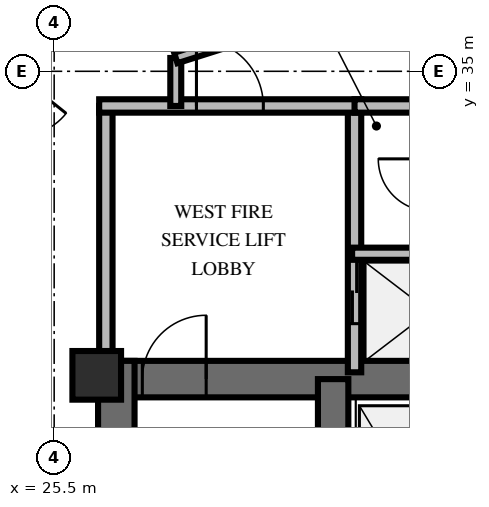
"""IFC4 building model, lengths in metres.
Left out: names, types, materials, properties, quantities, classifications, styles, units other than length and angle.
Written with IfcOpenShell. Run it as: python <this file> out.ifc"""

import sys

from ifc_helpers import new_model, si_unit, direction, frame, frame_2d, origin, origin_2d, place, context, subcontext, project, spatial, rectangle, extrude, element, fill, save


model = new_model("IFC4")
c1 = context("Model", 3, precision=1e-05, world=origin(), true_north=direction((0.0, 1.0)))
c2 = subcontext(c1, "Body", "Model", "MODEL_VIEW")
j1 = project(units=[si_unit("LENGTHUNIT", "METRE"), si_unit("PLANEANGLEUNIT", "RADIAN")], contexts=[c1])
p1 = place(None, origin())
s1 = spatial("IfcSite", under=j1, at=p1, CompositionType="ELEMENT")
p2 = place(p1, origin())
s2 = spatial("IfcBuilding", under=s1, at=p2, CompositionType="ELEMENT")
p3 = place(p2, frame((0.0, 0.0, 244.8)))
s3 = spatial("IfcBuildingStorey", under=s2, at=p3, CompositionType="ELEMENT", Elevation=244.8)
p4 = place(p3, frame((26.222, 29.938, 0.0), z_axis=(0.0, 0.0, 1.0), x_axis=(1.0, 0.0, 0.0)))
e1 = element("IfcWall", 1, at=p4, inside=s3, PredefinedType="SHEAR", context=c2, shape_type="SweptSolid", body=[
    extrude(rectangle(XDim=15.566, YDim=0.6, at=frame_2d((7.783, 0.0))), origin(), (0.0, 0.0, 1.0), 3.6),
])
p5 = place(p4, frame((0.728, 0.0, 0.0)))
e2 = element("IfcOpeningElement", 2, at=p5, cuts=e1, PredefinedType="OPENING", context=c2, shape_type="SweptSolid", body=[
    extrude(rectangle(XDim=1.05, YDim=2.15, at=frame_2d((0.525, 1.075))), frame((0.0, 0.31, 0.0), z_axis=(0.0, -1.0, 0.0), x_axis=(1.0, 0.0, 0.0)), (0.0, 0.0, 1.0), 0.62),
])
p6 = place(p4, frame((13.778, 0.0, 0.0)))
e3 = element("IfcOpeningElement", 3, at=p6, cuts=e1, PredefinedType="OPENING", context=c2, shape_type="SweptSolid", body=[
    extrude(rectangle(XDim=1.05, YDim=2.15, at=frame_2d((0.525, 1.075))), frame((0.0, 0.31, 0.0), z_axis=(0.0, -1.0, 0.0), x_axis=(1.0, 0.0, 0.0)), (0.0, 0.0, 1.0), 0.62),
])
p7 = place(p4, frame((7.228, 0.0, 0.0)))
e4 = element("IfcOpeningElement", 4, at=p7, cuts=e1, PredefinedType="OPENING", context=c2, shape_type="SweptSolid", body=[
    extrude(rectangle(XDim=1.1, YDim=2.15, at=frame_2d((0.55, 1.075))), frame((0.0, 0.31, 0.0), z_axis=(0.0, -1.0, 0.0), x_axis=(1.0, 0.0, 0.0)), (0.0, 0.0, 1.0), 0.62),
])
p8 = place(p3, frame((26.522, 19.962, 0.0), z_axis=(0.0, 0.0, 1.0), x_axis=(0.0, 1.0, 0.0)))
e5 = element("IfcWall", 5, at=p8, inside=s3, PredefinedType="SHEAR", context=c2, shape_type="SweptSolid", body=[
    extrude(rectangle(XDim=10.276, YDim=0.6, at=frame_2d((5.138, 0.0))), origin(), (0.0, 0.0, 1.0), 3.6),
])
p9 = place(p3, frame((30.088, 20.262, 0.0), z_axis=(0.0, 0.0, 1.0), x_axis=(0.0, 1.0, 0.0)))
e6 = element("IfcWall", 6, at=p9, inside=s3, PredefinedType="SHEAR", context=c2, shape_type="SweptSolid", body=[
    extrude(rectangle(XDim=9.676, YDim=0.5, at=frame_2d((4.838, 0.0))), origin(), (0.0, 0.0, 1.0), 3.6),
])
p10 = place(p3, frame((26.2, 30.0, 0.0), z_axis=(0.0, 0.0, 1.0), x_axis=(1.0, 0.0, 0.0)))
e7 = element("IfcColumn", 7, at=p10, inside=s3, PredefinedType="PILASTER", context=c2, shape_type="SweptSolid", body=[
    extrude(rectangle(XDim=0.8, YDim=0.8, at=origin_2d()), origin(), (0.0, 0.0, 1.0), 3.6),
])
p11 = place(p3, frame((26.35, 30.05, 0.0), z_axis=(0.0, 0.0, 1.0), x_axis=(0.0, 1.0, 0.0)))
e8 = element("IfcWall", 8, at=p11, inside=s3, PredefinedType="SOLIDWALL", context=c2, shape_type="SweptSolid", body=[
    extrude(rectangle(XDim=4.38, YDim=0.22, at=frame_2d((2.19, 0.0))), origin(), (0.0, 0.0, 1.0), 2.46),
])
p12 = place(p3, frame((30.44, 30.05, 0.0), z_axis=(0.0, 0.0, 1.0), x_axis=(0.0, 1.0, 0.0)))
e9 = element("IfcWall", 9, at=p12, inside=s3, PredefinedType="SOLIDWALL", context=c2, shape_type="SweptSolid", body=[
    extrude(rectangle(XDim=4.38, YDim=0.22, at=frame_2d((2.19, 0.0))), origin(), (0.0, 0.0, 1.0), 2.46),
])
p13 = place(p12, frame((0.8, 0.0, 0.0)))
e10 = element("IfcOpeningElement", 10, at=p13, cuts=e9, PredefinedType="OPENING", context=c2, shape_type="SweptSolid", body=[
    extrude(rectangle(XDim=1.05, YDim=2.1, at=frame_2d((0.525, 1.05))), frame((0.0, 0.12, 0.0), z_axis=(0.0, -1.0, 0.0), x_axis=(1.0, 0.0, 0.0)), (0.0, 0.0, 1.0), 0.24),
])
p14 = place(p3, frame((26.24, 34.43, 0.0), z_axis=(0.0, 0.0, 1.0), x_axis=(1.0, 0.0, 0.0)))
e11 = element("IfcWall", 11, at=p14, inside=s3, PredefinedType="SOLIDWALL", context=c2, shape_type="SweptSolid", body=[
    extrude(rectangle(XDim=4.31, YDim=0.22, at=frame_2d((2.155, 0.0))), origin(), (0.0, 0.0, 1.0), 2.46),
])
p15 = place(p14, frame((1.6, 0.0, 0.0)))
e12 = element("IfcOpeningElement", 12, at=p15, cuts=e11, PredefinedType="OPENING", context=c2, shape_type="SweptSolid", body=[
    extrude(rectangle(XDim=1.1, YDim=2.15, at=frame_2d((0.55, 1.075))), frame((0.0, 0.12, 0.0), z_axis=(0.0, -1.0, 0.0), x_axis=(1.0, 0.0, 0.0)), (0.0, 0.0, 1.0), 0.24),
])
p16 = place(p3, frame((30.4, 32.0, 0.0), z_axis=(0.0, 0.0, 1.0), x_axis=(1.0, 0.0, 0.0)))
e13 = element("IfcWall", 13, at=p16, inside=s3, PredefinedType="SOLIDWALL", context=c2, shape_type="SweptSolid", body=[
    extrude(rectangle(XDim=2.55, YDim=0.2, at=frame_2d((1.275, 0.0))), origin(), (0.0, 0.0, 1.0), 2.46),
])
p17 = place(p3, frame((30.44, 34.43, 0.0), z_axis=(0.0, 0.0, 1.0), x_axis=(1.0, 0.0, 0.0)))
e14 = element("IfcWall", 14, at=p17, inside=s3, PredefinedType="SOLIDWALL", context=c2, shape_type="SweptSolid", body=[
    extrude(rectangle(XDim=7.12, YDim=0.22, at=frame_2d((3.56, 0.0))), origin(), (0.0, 0.0, 1.0), 2.46),
])
p18 = place(p17, frame((3.01, 0.0, 0.0)))
e15 = element("IfcOpeningElement", 15, at=p18, cuts=e14, PredefinedType="OPENING", context=c2, shape_type="SweptSolid", body=[
    extrude(rectangle(XDim=1.1, YDim=2.15, at=frame_2d((0.55, 1.075))), frame((0.0, 0.12, 0.0), z_axis=(0.0, -1.0, 0.0), x_axis=(1.0, 0.0, 0.0)), (0.0, 0.0, 1.0), 0.24),
])
p19 = place(p3, frame((27.5, 34.43, 0.0), z_axis=(0.0, 0.0, 1.0), x_axis=(0.0, 1.0, 0.0)))
e16 = element("IfcWall", 16, at=p19, inside=s3, PredefinedType="PARTITIONING", context=c2, shape_type="SweptSolid", body=[
    extrude(rectangle(XDim=0.789, YDim=0.18, at=frame_2d((0.395, 0.0))), origin(), (0.0, 0.0, 1.0), 2.46),
])
p20 = place(p3, frame((27.5, 35.219, 0.0), z_axis=(0.0, 0.0, 1.0), x_axis=(0.953228121756, 0.302251795518, 0.0)))
e17 = element("IfcWall", 17, at=p20, inside=s3, PredefinedType="PARTITIONING", context=c2, shape_type="SweptSolid", body=[
    extrude(rectangle(XDim=6.819, YDim=0.18, at=frame_2d((3.409, 0.0))), origin(), (0.0, 0.0, 1.0), 2.46),
])
p21 = place(p20, frame((2.86, 0.0, 0.0)))
e18 = element("IfcOpeningElement", 18, at=p21, cuts=e17, PredefinedType="OPENING", context=c2, shape_type="SweptSolid", body=[
    extrude(rectangle(XDim=1.1, YDim=2.15, at=frame_2d((0.55, 1.075))), frame((0.0, 0.1, 0.0), z_axis=(0.0, -1.0, 0.0), x_axis=(1.0, 0.0, 0.0)), (0.0, 0.0, 1.0), 0.2),
])
p22 = place(p3, frame((25.506, 35.669, 0.0), z_axis=(0.0, 0.0, 1.0), x_axis=(-0.625247763114, -0.78042631601, 0.0)))
e19 = element("IfcWall", 19, at=p22, inside=s3, PredefinedType="PARTITIONING", context=c2, shape_type="SweptSolid", body=[
    extrude(rectangle(XDim=4.47, YDim=0.18, at=frame_2d((2.235, 0.0))), origin(), (0.0, 0.0, 1.0), 2.46),
])
p23 = place(p22, frame((0.942, 0.0, 0.0)))
e20 = element("IfcOpeningElement", 20, at=p23, cuts=e19, PredefinedType="OPENING", context=c2, shape_type="SweptSolid", body=[
    extrude(rectangle(XDim=1.0, YDim=2.15, at=frame_2d((0.5, 1.075))), frame((0.0, 0.1, 0.0), z_axis=(0.0, -1.0, 0.0), x_axis=(1.0, 0.0, 0.0)), (0.0, 0.0, 1.0), 0.2),
])
p24 = place(p5, origin())
e21 = element("IfcDoor", 21, at=p24, inside=s3, OperationType="SINGLE_SWING_RIGHT", PredefinedType="DOOR", context=c2, shape_type="SweptSolid", body=[
    extrude(rectangle(XDim=1.05, YDim=2.15, at=frame_2d((0.525, 1.075))), frame((0.0, 0.025, 0.0), z_axis=(0.0, -1.0, 0.0), x_axis=(1.0, 0.0, 0.0)), (0.0, 0.0, 1.0), 0.05),
])
fill(e2, e21)
p25 = place(p15, origin())
e22 = element("IfcDoor", 22, at=p25, inside=s3, OperationType="SINGLE_SWING_LEFT", PredefinedType="DOOR", context=c2, shape_type="SweptSolid", body=[
    extrude(rectangle(XDim=1.1, YDim=2.15, at=frame_2d((0.55, 1.075))), frame((0.0, 0.025, 0.0), z_axis=(0.0, -1.0, 0.0), x_axis=(1.0, 0.0, 0.0)), (0.0, 0.0, 1.0), 0.05),
])
fill(e12, e22)
p26 = place(p13, origin())
e23 = element("IfcDoor", 23, at=p26, inside=s3, OperationType="DOUBLE_DOOR_SLIDING", PredefinedType="USERDEFINED", context=c2, shape_type="SweptSolid", body=[
    extrude(rectangle(XDim=1.05, YDim=2.1, at=frame_2d((0.525, 1.05))), frame((0.0, 0.025, 0.0), z_axis=(0.0, -1.0, 0.0), x_axis=(1.0, 0.0, 0.0)), (0.0, 0.0, 1.0), 0.05),
])
fill(e10, e23)
save(model, sys.argv[1])
